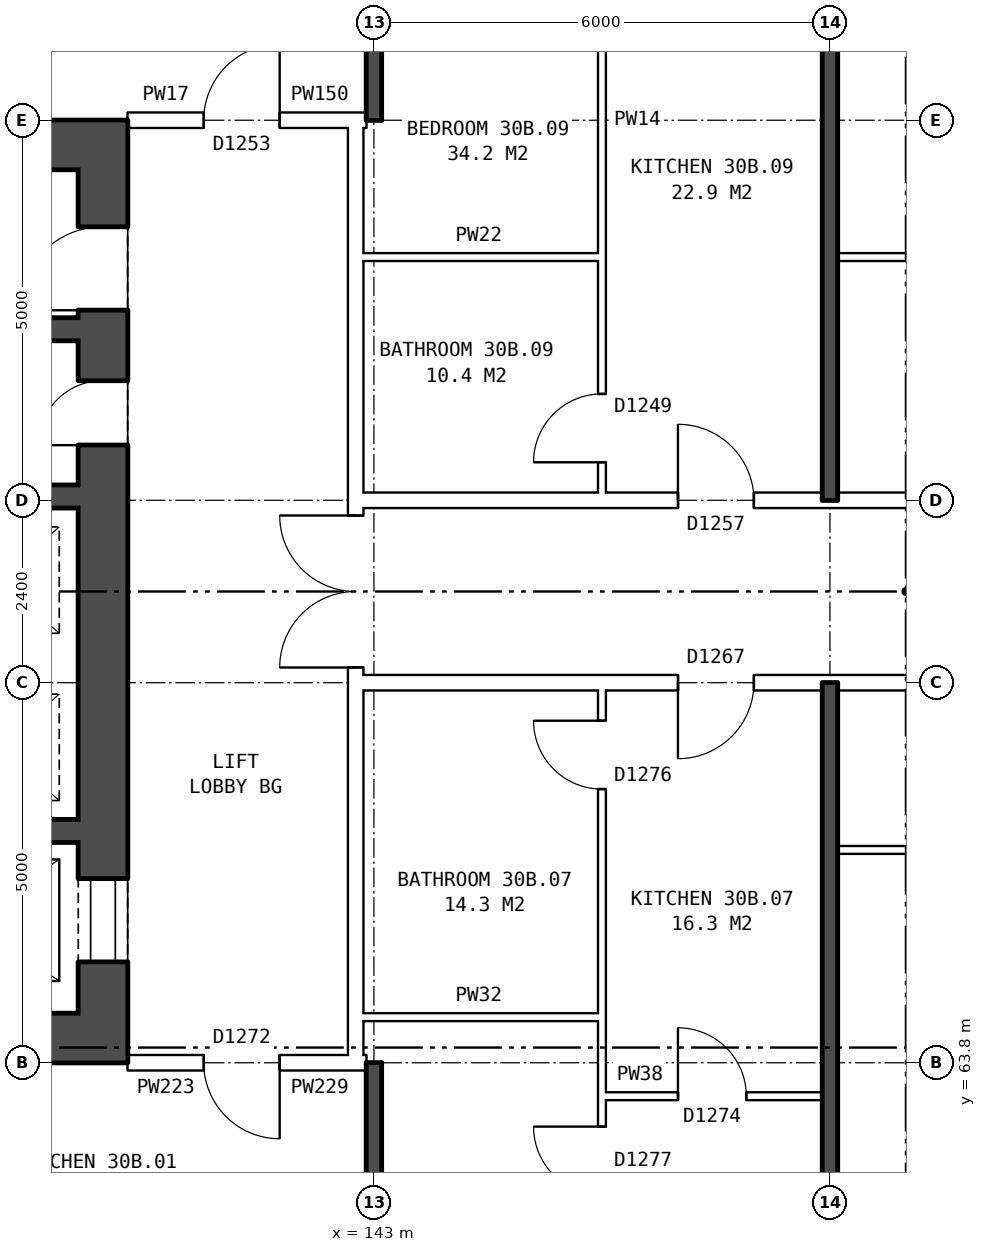
"""IFC4 building model, lengths in metres.
Left out: names, types, materials, properties, quantities, classifications, styles, units other than length and angle.
Written with IfcOpenShell. Run it as: python <this file> out.ifc"""

import sys

from ifc_helpers import new_model, si_unit, direction, frame, frame_2d, origin, place, context, subcontext, project, spatial, rectangle, extrude, element, fill, save


model = new_model("IFC4")
c1 = context("Model", 3, precision=1e-05, world=origin(), true_north=direction((0.0, 1.0)))
c2 = subcontext(c1, "Body", "Model", "MODEL_VIEW")
j1 = project(units=[si_unit("LENGTHUNIT", "METRE"), si_unit("PLANEANGLEUNIT", "RADIAN")], contexts=[c1])
p1 = place(None, origin())
s1 = spatial("IfcSite", under=j1, at=p1, CompositionType="ELEMENT")
p2 = place(p1, origin())
s2 = spatial("IfcBuilding", under=s1, at=p2, CompositionType="ELEMENT")
p3 = place(p2, frame((0.0, 0.0, 108.8)))
s3 = spatial("IfcBuildingStorey", under=s2, at=p3, CompositionType="ELEMENT", Elevation=108.8)
p4 = place(p3, frame((139.435, 64.45, 0.0), z_axis=(0.0, 0.0, 1.0), x_axis=(0.0, 1.0, 0.0)))
e1 = element("IfcWall", 1, at=p4, inside=s3, PredefinedType="SHEAR", context=c2, shape_type="SweptSolid", body=[
    extrude(rectangle(XDim=11.1, YDim=0.65, at=frame_2d((5.55, 0.0))), origin(), (0.0, 0.0, 1.0), 2.85),
])
p5 = place(p4, frame((0.675, 0.0, 0.0)))
e2 = element("IfcOpeningElement", 2, at=p5, cuts=e1, PredefinedType="OPENING", context=c2, shape_type="SweptSolid", body=[
    extrude(rectangle(XDim=1.1, YDim=2.1, at=frame_2d((0.55, 1.05))), frame((0.0, 0.335, 0.0), z_axis=(0.0, -1.0, 0.0), x_axis=(1.0, 0.0, 0.0)), (0.0, 0.0, 1.0), 0.67),
])
p6 = place(p4, frame((9.25, 0.0, 0.0)))
e3 = element("IfcOpeningElement", 3, at=p6, cuts=e1, PredefinedType="OPENING", context=c2, shape_type="SweptSolid", body=[
    extrude(rectangle(XDim=1.1, YDim=2.1, at=frame_2d((0.55, 1.05))), frame((0.0, 0.335, 0.0), z_axis=(0.0, -1.0, 0.0), x_axis=(1.0, 0.0, 0.0)), (0.0, 0.0, 1.0), 0.67),
])
p7 = place(p4, frame((7.475, 0.0, 0.0)))
e4 = element("IfcOpeningElement", 4, at=p7, cuts=e1, PredefinedType="OPENING", context=c2, shape_type="SweptSolid", body=[
    extrude(rectangle(XDim=0.85, YDim=2.1, at=frame_2d((0.425, 1.05))), frame((0.0, 0.335, 0.0), z_axis=(0.0, -1.0, 0.0), x_axis=(1.0, 0.0, 0.0)), (0.0, 0.0, 1.0), 0.67),
])
for number, where, z_axis, x_axis in (
    (5, (139.76, 64.125, 0.0), (0.0, 0.0, 1.0), (-1.0, 0.0, 0.0)),
    (6, (139.76, 75.875, 0.0), (0.0, 0.0, 1.0), (-1.0, 0.0, 0.0)),
):
    element("IfcWall", number, at=place(p3, frame(where, z_axis=z_axis, x_axis=x_axis)), inside=s3, PredefinedType="SHEAR", context=c2, shape_type="SweptSolid", body=[
        extrude(rectangle(XDim=8.4, YDim=0.65, at=frame_2d((4.2, 0.0))), origin(), (0.0, 0.0, 1.0), 2.85),
    ])
p8 = place(p3, frame((139.11, 66.85, 0.0), z_axis=(0.0, 0.0, 1.0), x_axis=(-1.0, 0.0, 0.0)))
e7 = element("IfcWall", 7, at=p8, inside=s3, PredefinedType="SHEAR", context=c2, shape_type="SweptSolid", body=[
    extrude(rectangle(XDim=4.25, YDim=0.3, at=frame_2d((2.125, 0.0))), origin(), (0.0, 0.0, 1.0), 2.85),
])
p9 = place(p3, frame((139.11, 71.25, 0.0), z_axis=(0.0, 0.0, 1.0), x_axis=(-1.0, 0.0, 0.0)))
e8 = element("IfcWall", 8, at=p9, inside=s3, PredefinedType="SHEAR", context=c2, shape_type="SweptSolid", body=[
    extrude(rectangle(XDim=7.1, YDim=0.3, at=frame_2d((3.55, 0.0))), origin(), (0.0, 0.0, 1.0), 2.85),
])
p10 = place(p9, frame((4.7, 0.0, 0.0)))
e9 = element("IfcOpeningElement", 9, at=p10, cuts=e8, PredefinedType="OPENING", context=c2, shape_type="SweptSolid", body=[
    extrude(rectangle(XDim=1.1, YDim=2.1, at=frame_2d((0.55, 1.05))), frame((0.0, 0.16, 0.0), z_axis=(0.0, -1.0, 0.0), x_axis=(1.0, 0.0, 0.0)), (0.0, 0.0, 1.0), 0.32),
])
p11 = place(p9, frame((2.975, 0.0, 0.0)))
e10 = element("IfcOpeningElement", 10, at=p11, cuts=e8, PredefinedType="OPENING", context=c2, shape_type="SweptSolid", body=[
    extrude(rectangle(XDim=0.85, YDim=2.1, at=frame_2d((0.425, 1.05))), frame((0.0, 0.16, 0.0), z_axis=(0.0, -1.0, 0.0), x_axis=(1.0, 0.0, 0.0)), (0.0, 0.0, 1.0), 0.32),
])
p12 = place(p3, frame((139.11, 73.45, 0.0), z_axis=(0.0, 0.0, 1.0), x_axis=(-1.0, 0.0, 0.0)))
e11 = element("IfcWall", 11, at=p12, inside=s3, PredefinedType="SHEAR", context=c2, shape_type="SweptSolid", body=[
    extrude(rectangle(XDim=2.25, YDim=0.3, at=frame_2d((1.125, 0.0))), origin(), (0.0, 0.0, 1.0), 2.85),
])
p13 = place(p3, frame((142.76, 63.9, 0.0), z_axis=(0.0, 0.0, 1.0), x_axis=(0.0, 1.0, 0.0)))
e12 = element("IfcWall", 12, at=p13, inside=s3, PredefinedType="PARTITIONING", context=c2, shape_type="SweptSolid", body=[
    extrude(rectangle(XDim=12.2, YDim=0.2, at=frame_2d((6.1, 0.0))), origin(), (0.0, 0.0, 1.0), 2.85),
])
p14 = place(p13, frame((5.1, 0.0, 0.0)))
e13 = element("IfcOpeningElement", 13, at=p14, cuts=e12, PredefinedType="OPENING", context=c2, shape_type="SweptSolid", body=[
    extrude(rectangle(XDim=2.0, YDim=2.1, at=frame_2d((1.0, 1.05))), frame((0.0, 0.11, 0.0), z_axis=(0.0, -1.0, 0.0), x_axis=(1.0, 0.0, 0.0)), (0.0, 0.0, 1.0), 0.22),
])
p15 = place(p3, frame((146.0, 63.36, 0.0), z_axis=(0.0, 0.0, 1.0), x_axis=(1.0, 0.0, 0.0)))
e14 = element("IfcWall", 14, at=p15, inside=s3, PredefinedType="PARTITIONING", context=c2, shape_type="SweptSolid", body=[
    extrude(rectangle(XDim=2.9, YDim=0.1, at=frame_2d((1.45, 0.0))), origin(), (0.0, 0.0, 1.0), 2.85),
])
p16 = place(p15, frame((1.0, 0.0, 0.0)))
e15 = element("IfcOpeningElement", 15, at=p16, cuts=e14, PredefinedType="OPENING", context=c2, shape_type="SweptSolid", body=[
    extrude(rectangle(XDim=0.9, YDim=2.1, at=frame_2d((0.45, 1.05))), frame((0.0, 0.06, 0.0), z_axis=(0.0, -1.0, 0.0), x_axis=(1.0, 0.0, 0.0)), (0.0, 0.0, 1.0), 0.12),
])
p17 = place(p3, frame((139.76, 63.8, 0.0), z_axis=(0.0, 0.0, 1.0), x_axis=(1.0, 0.0, 0.0)))
e16 = element("IfcWall", 16, at=p17, inside=s3, PredefinedType="PARTITIONING", context=c2, shape_type="SweptSolid", body=[
    extrude(rectangle(XDim=3.0, YDim=0.2, at=frame_2d((1.5, 0.0))), origin(), (0.0, 0.0, 1.0), 2.85),
])
p18 = place(p17, frame((1.0, 0.0, 0.0)))
e17 = element("IfcOpeningElement", 17, at=p18, cuts=e16, PredefinedType="OPENING", context=c2, shape_type="SweptSolid", body=[
    extrude(rectangle(XDim=1.0, YDim=2.1, at=frame_2d((0.5, 1.05))), frame((0.0, 0.11, 0.0), z_axis=(0.0, -1.0, 0.0), x_axis=(1.0, 0.0, 0.0)), (0.0, 0.0, 1.0), 0.22),
])
p19 = place(p3, frame((142.76, 63.8, 0.0), z_axis=(0.0, 0.0, 1.0), x_axis=(1.0, 0.0, 0.0)))
e18 = element("IfcWall", 18, at=p19, inside=s3, PredefinedType="PARTITIONING", context=c2, shape_type="SweptSolid", body=[
    extrude(rectangle(XDim=0.14, YDim=0.2, at=frame_2d((0.07, 0.0))), origin(), (0.0, 0.0, 1.0), 2.85),
])
p20 = place(p3, frame((142.76, 64.4, 0.0), z_axis=(0.0, 0.0, 1.0), x_axis=(1.0, 0.0, 0.0)))
e19 = element("IfcWall", 19, at=p20, inside=s3, PredefinedType="PARTITIONING", context=c2, shape_type="SweptSolid", body=[
    extrude(rectangle(XDim=3.24, YDim=0.1, at=frame_2d((1.62, 0.0))), origin(), (0.0, 0.0, 1.0), 2.85),
])
p21 = place(p3, frame((149.1, 66.6, 0.0), z_axis=(0.0, 0.0, 1.0), x_axis=(1.0, 0.0, 0.0)))
e20 = element("IfcWall", 20, at=p21, inside=s3, PredefinedType="PARTITIONING", context=c2, shape_type="SweptSolid", body=[
    extrude(rectangle(XDim=2.9, YDim=0.1, at=frame_2d((1.45, 0.0))), origin(), (0.0, 0.0, 1.0), 2.85),
])
p22 = place(p3, frame((142.76, 68.8, 0.0), z_axis=(0.0, 0.0, 1.0), x_axis=(1.0, 0.0, 0.0)))
e21 = element("IfcWall", 21, at=p22, inside=s3, PredefinedType="PARTITIONING", context=c2, shape_type="SweptSolid", body=[
    extrude(rectangle(XDim=14.48, YDim=0.2, at=frame_2d((7.24, 0.0))), origin(), (0.0, 0.0, 1.0), 2.85),
])
p23 = place(p22, frame((4.24, 0.0, 0.0)))
e22 = element("IfcOpeningElement", 22, at=p23, cuts=e21, PredefinedType="OPENING", context=c2, shape_type="SweptSolid", body=[
    extrude(rectangle(XDim=1.0, YDim=2.1, at=frame_2d((0.5, 1.05))), frame((0.0, 0.11, 0.0), z_axis=(0.0, -1.0, 0.0), x_axis=(1.0, 0.0, 0.0)), (0.0, 0.0, 1.0), 0.22),
])
p24 = place(p22, frame((10.24, 0.0, 0.0)))
e23 = element("IfcOpeningElement", 23, at=p24, cuts=e21, PredefinedType="OPENING", context=c2, shape_type="SweptSolid", body=[
    extrude(rectangle(XDim=1.0, YDim=2.1, at=frame_2d((0.5, 1.05))), frame((0.0, 0.11, 0.0), z_axis=(0.0, -1.0, 0.0), x_axis=(1.0, 0.0, 0.0)), (0.0, 0.0, 1.0), 0.22),
])
p25 = place(p3, frame((142.76, 71.2, 0.0), z_axis=(0.0, 0.0, 1.0), x_axis=(1.0, 0.0, 0.0)))
e24 = element("IfcWall", 24, at=p25, inside=s3, PredefinedType="PARTITIONING", context=c2, shape_type="SweptSolid", body=[
    extrude(rectangle(XDim=14.48, YDim=0.2, at=frame_2d((7.24, 0.0))), origin(), (0.0, 0.0, 1.0), 2.85),
])
p26 = place(p25, frame((4.24, 0.0, 0.0)))
e25 = element("IfcOpeningElement", 25, at=p26, cuts=e24, PredefinedType="OPENING", context=c2, shape_type="SweptSolid", body=[
    extrude(rectangle(XDim=1.0, YDim=2.1, at=frame_2d((0.5, 1.05))), frame((0.0, 0.11, 0.0), z_axis=(0.0, -1.0, 0.0), x_axis=(1.0, 0.0, 0.0)), (0.0, 0.0, 1.0), 0.22),
])
p27 = place(p25, frame((10.24, 0.0, 0.0)))
e26 = element("IfcOpeningElement", 26, at=p27, cuts=e24, PredefinedType="OPENING", context=c2, shape_type="SweptSolid", body=[
    extrude(rectangle(XDim=1.0, YDim=2.1, at=frame_2d((0.5, 1.05))), frame((0.0, 0.11, 0.0), z_axis=(0.0, -1.0, 0.0), x_axis=(1.0, 0.0, 0.0)), (0.0, 0.0, 1.0), 0.22),
])
p28 = place(p3, frame((142.76, 74.4, 0.0), z_axis=(0.0, 0.0, 1.0), x_axis=(1.0, 0.0, 0.0)))
e27 = element("IfcWall", 27, at=p28, inside=s3, PredefinedType="PARTITIONING", context=c2, shape_type="SweptSolid", body=[
    extrude(rectangle(XDim=3.24, YDim=0.1, at=frame_2d((1.62, 0.0))), origin(), (0.0, 0.0, 1.0), 2.85),
])
p29 = place(p3, frame((149.1, 74.4, 0.0), z_axis=(0.0, 0.0, 1.0), x_axis=(1.0, 0.0, 0.0)))
e28 = element("IfcWall", 28, at=p29, inside=s3, PredefinedType="PARTITIONING", context=c2, shape_type="SweptSolid", body=[
    extrude(rectangle(XDim=2.9, YDim=0.1, at=frame_2d((1.45, 0.0))), origin(), (0.0, 0.0, 1.0), 2.85),
])
p30 = place(p3, frame((139.76, 76.2, 0.0), z_axis=(0.0, 0.0, 1.0), x_axis=(1.0, 0.0, 0.0)))
e29 = element("IfcWall", 29, at=p30, inside=s3, PredefinedType="PARTITIONING", context=c2, shape_type="SweptSolid", body=[
    extrude(rectangle(XDim=3.0, YDim=0.2, at=frame_2d((1.5, 0.0))), origin(), (0.0, 0.0, 1.0), 2.85),
])
p31 = place(p30, frame((1.0, 0.0, 0.0)))
e30 = element("IfcOpeningElement", 30, at=p31, cuts=e29, PredefinedType="OPENING", context=c2, shape_type="SweptSolid", body=[
    extrude(rectangle(XDim=1.0, YDim=2.1, at=frame_2d((0.5, 1.05))), frame((0.0, 0.11, 0.0), z_axis=(0.0, -1.0, 0.0), x_axis=(1.0, 0.0, 0.0)), (0.0, 0.0, 1.0), 0.22),
])
p32 = place(p3, frame((142.76, 76.2, 0.0), z_axis=(0.0, 0.0, 1.0), x_axis=(1.0, 0.0, 0.0)))
e31 = element("IfcWall", 31, at=p32, inside=s3, PredefinedType="PARTITIONING", context=c2, shape_type="SweptSolid", body=[
    extrude(rectangle(XDim=0.14, YDim=0.2, at=frame_2d((0.07, 0.0))), origin(), (0.0, 0.0, 1.0), 2.85),
])
for number, where, z_axis, x_axis in (
    (32, (143.0, 54.36, 0.0), (0.0, 0.0, 1.0), (0.0, 1.0, 0.0)),
    (33, (143.0, 76.2, 0.0), (0.0, 0.0, 1.0), (0.0, 1.0, 0.0)),
):
    element("IfcWall", number, at=place(p3, frame(where, z_axis=z_axis, x_axis=x_axis)), inside=s3, PredefinedType="SOLIDWALL", context=c2, shape_type="SweptSolid", body=[
        extrude(rectangle(XDim=9.44, YDim=0.2, at=frame_2d((4.72, 0.0))), origin(), (0.0, 0.0, 1.0), 2.85),
    ])
p33 = place(p3, frame((146.0, 54.36, 0.0), z_axis=(0.0, 0.0, 1.0), x_axis=(0.0, 1.0, 0.0)))
e34 = element("IfcWall", 34, at=p33, inside=s3, PredefinedType="PARTITIONING", context=c2, shape_type="SweptSolid", body=[
    extrude(rectangle(XDim=14.34, YDim=0.1, at=frame_2d((7.17, 0.0))), origin(), (0.0, 0.0, 1.0), 2.85),
])
p34 = place(p33, frame((7.7, 0.0, 0.0)))
e35 = element("IfcOpeningElement", 35, at=p34, cuts=e34, PredefinedType="OPENING", context=c2, shape_type="SweptSolid", body=[
    extrude(rectangle(XDim=0.9, YDim=2.1, at=frame_2d((0.45, 1.05))), frame((0.0, 0.06, 0.0), z_axis=(0.0, -1.0, 0.0), x_axis=(1.0, 0.0, 0.0)), (0.0, 0.0, 1.0), 0.12),
])
p35 = place(p33, frame((13.04, 0.0, 0.0)))
e36 = element("IfcOpeningElement", 36, at=p35, cuts=e34, PredefinedType="OPENING", context=c2, shape_type="SweptSolid", body=[
    extrude(rectangle(XDim=0.9, YDim=2.1, at=frame_2d((0.45, 1.05))), frame((0.0, 0.06, 0.0), z_axis=(0.0, -1.0, 0.0), x_axis=(1.0, 0.0, 0.0)), (0.0, 0.0, 1.0), 0.12),
])
p36 = place(p3, frame((146.0, 71.3, 0.0), z_axis=(0.0, 0.0, 1.0), x_axis=(0.0, 1.0, 0.0)))
e37 = element("IfcWall", 37, at=p36, inside=s3, PredefinedType="PARTITIONING", context=c2, shape_type="SweptSolid", body=[
    extrude(rectangle(XDim=14.34, YDim=0.1, at=frame_2d((7.17, 0.0))), origin(), (0.0, 0.0, 1.0), 2.85),
])
p37 = place(p36, frame((7.94, 0.0, 0.0)))
e38 = element("IfcOpeningElement", 38, at=p37, cuts=e37, PredefinedType="OPENING", context=c2, shape_type="SweptSolid", body=[
    extrude(rectangle(XDim=0.9, YDim=2.1, at=frame_2d((0.45, 1.05))), frame((0.0, 0.06, 0.0), z_axis=(0.0, -1.0, 0.0), x_axis=(1.0, 0.0, 0.0)), (0.0, 0.0, 1.0), 0.12),
])
p38 = place(p36, frame((0.4, 0.0, 0.0)))
e39 = element("IfcOpeningElement", 39, at=p38, cuts=e37, PredefinedType="OPENING", context=c2, shape_type="SweptSolid", body=[
    extrude(rectangle(XDim=0.9, YDim=2.1, at=frame_2d((0.45, 1.05))), frame((0.0, 0.06, 0.0), z_axis=(0.0, -1.0, 0.0), x_axis=(1.0, 0.0, 0.0)), (0.0, 0.0, 1.0), 0.12),
])
for number, where, z_axis, x_axis in (
    (40, (149.0, 54.36, 0.0), (0.0, 0.0, 1.0), (0.0, 1.0, 0.0)),
    (41, (149.0, 71.2, 0.0), (0.0, 0.0, 1.0), (0.0, 1.0, 0.0)),
):
    element("IfcWall", number, at=place(p3, frame(where, z_axis=z_axis, x_axis=x_axis)), inside=s3, PredefinedType="SOLIDWALL", context=c2, shape_type="SweptSolid", body=[
        extrude(rectangle(XDim=14.44, YDim=0.2, at=frame_2d((7.22, 0.0))), origin(), (0.0, 0.0, 1.0), 2.85),
    ])
p39 = place(p5, origin())
e42 = element("IfcDoor", 42, at=p39, inside=s3, OperationType="DOUBLE_DOOR_SLIDING", PredefinedType="DOOR", context=c2, shape_type="SweptSolid", body=[
    extrude(rectangle(XDim=1.1, YDim=2.1, at=frame_2d((0.55, 1.05))), frame((0.0, 0.31, 0.0), z_axis=(0.0, -1.0, 0.0), x_axis=(1.0, 0.0, 0.0)), (0.0, 0.0, 1.0), 0.05),
])
fill(e2, e42)
p40 = place(p6, origin())
e43 = element("IfcDoor", 43, at=p40, inside=s3, OperationType="SINGLE_SWING_LEFT", PredefinedType="DOOR", context=c2, shape_type="SweptSolid", body=[
    extrude(rectangle(XDim=1.1, YDim=2.1, at=frame_2d((0.55, 1.05))), frame((0.0, 0.31, 0.0), z_axis=(0.0, -1.0, 0.0), x_axis=(1.0, 0.0, 0.0)), (0.0, 0.0, 1.0), 0.05),
])
fill(e3, e43)
p41 = place(p7, origin())
e44 = element("IfcDoor", 44, at=p41, inside=s3, OperationType="SINGLE_SWING_LEFT", PredefinedType="DOOR", context=c2, shape_type="SweptSolid", body=[
    extrude(rectangle(XDim=0.85, YDim=2.1, at=frame_2d((0.425, 1.05))), frame((0.0, 0.31, 0.0), z_axis=(0.0, -1.0, 0.0), x_axis=(1.0, 0.0, 0.0)), (0.0, 0.0, 1.0), 0.05),
])
fill(e4, e44)
p42 = place(p14, origin())
e45 = element("IfcDoor", 45, at=p42, inside=s3, OperationType="DOUBLE_DOOR_SINGLE_SWING", PredefinedType="DOOR", context=c2, shape_type="SweptSolid", body=[
    extrude(rectangle(XDim=2.0, YDim=2.1, at=frame_2d((1.0, 1.05))), frame((0.0, 0.025, 0.0), z_axis=(0.0, -1.0, 0.0), x_axis=(1.0, 0.0, 0.0)), (0.0, 0.0, 1.0), 0.05),
])
fill(e13, e45)
p43 = place(p18, frame((1.0, 0.0, 0.0), z_axis=(0.0, 0.0, 1.0), x_axis=(-1.0, 0.0, 0.0)))
e46 = element("IfcDoor", 46, at=p43, inside=s3, OperationType="SINGLE_SWING_LEFT", PredefinedType="DOOR", context=c2, shape_type="SweptSolid", body=[
    extrude(rectangle(XDim=1.0, YDim=2.1, at=frame_2d((0.5, 1.05))), frame((0.0, 0.025, 0.0), z_axis=(0.0, -1.0, 0.0), x_axis=(1.0, 0.0, 0.0)), (0.0, 0.0, 1.0), 0.05),
])
fill(e17, e46)
p44 = place(p31, origin())
e47 = element("IfcDoor", 47, at=p44, inside=s3, OperationType="SINGLE_SWING_RIGHT", PredefinedType="DOOR", context=c2, shape_type="SweptSolid", body=[
    extrude(rectangle(XDim=1.0, YDim=2.1, at=frame_2d((0.5, 1.05))), frame((0.0, 0.025, 0.0), z_axis=(0.0, -1.0, 0.0), x_axis=(1.0, 0.0, 0.0)), (0.0, 0.0, 1.0), 0.05),
])
fill(e30, e47)
p45 = place(p34, origin())
e48 = element("IfcDoor", 48, at=p45, inside=s3, OperationType="SINGLE_SWING_RIGHT", PredefinedType="DOOR", context=c2, shape_type="SweptSolid", body=[
    extrude(rectangle(XDim=0.9, YDim=2.1, at=frame_2d((0.45, 1.05))), frame((0.0, 0.025, 0.0), z_axis=(0.0, -1.0, 0.0), x_axis=(1.0, 0.0, 0.0)), (0.0, 0.0, 1.0), 0.05),
])
fill(e35, e48)
p46 = place(p23, frame((1.0, 0.0, 0.0), z_axis=(0.0, 0.0, 1.0), x_axis=(-1.0, 0.0, 0.0)))
e49 = element("IfcDoor", 49, at=p46, inside=s3, OperationType="SINGLE_SWING_RIGHT", PredefinedType="DOOR", context=c2, shape_type="SweptSolid", body=[
    extrude(rectangle(XDim=1.0, YDim=2.1, at=frame_2d((0.5, 1.05))), frame((0.0, 0.025, 0.0), z_axis=(0.0, -1.0, 0.0), x_axis=(1.0, 0.0, 0.0)), (0.0, 0.0, 1.0), 0.05),
])
fill(e22, e49)
p47 = place(p16, origin())
e50 = element("IfcDoor", 50, at=p47, inside=s3, OperationType="SINGLE_SWING_LEFT", PredefinedType="DOOR", context=c2, shape_type="SweptSolid", body=[
    extrude(rectangle(XDim=0.9, YDim=2.1, at=frame_2d((0.45, 1.05))), frame((0.0, 0.025, 0.0), z_axis=(0.0, -1.0, 0.0), x_axis=(1.0, 0.0, 0.0)), (0.0, 0.0, 1.0), 0.05),
])
fill(e15, e50)
p48 = place(p35, origin())
e51 = element("IfcDoor", 51, at=p48, inside=s3, OperationType="SINGLE_SWING_RIGHT", PredefinedType="DOOR", context=c2, shape_type="SweptSolid", body=[
    extrude(rectangle(XDim=0.9, YDim=2.1, at=frame_2d((0.45, 1.05))), frame((0.0, 0.025, 0.0), z_axis=(0.0, -1.0, 0.0), x_axis=(1.0, 0.0, 0.0)), (0.0, 0.0, 1.0), 0.05),
])
fill(e36, e51)
p49 = place(p26, origin())
e52 = element("IfcDoor", 52, at=p49, inside=s3, OperationType="SINGLE_SWING_LEFT", PredefinedType="DOOR", context=c2, shape_type="SweptSolid", body=[
    extrude(rectangle(XDim=1.0, YDim=2.1, at=frame_2d((0.5, 1.05))), frame((0.0, 0.025, 0.0), z_axis=(0.0, -1.0, 0.0), x_axis=(1.0, 0.0, 0.0)), (0.0, 0.0, 1.0), 0.05),
])
fill(e25, e52)
p50 = place(p38, origin())
e53 = element("IfcDoor", 53, at=p50, inside=s3, OperationType="SINGLE_SWING_LEFT", PredefinedType="DOOR", context=c2, shape_type="SweptSolid", body=[
    extrude(rectangle(XDim=0.9, YDim=2.1, at=frame_2d((0.45, 1.05))), frame((0.0, 0.025, 0.0), z_axis=(0.0, -1.0, 0.0), x_axis=(1.0, 0.0, 0.0)), (0.0, 0.0, 1.0), 0.05),
])
fill(e39, e53)
save(model, sys.argv[1])
